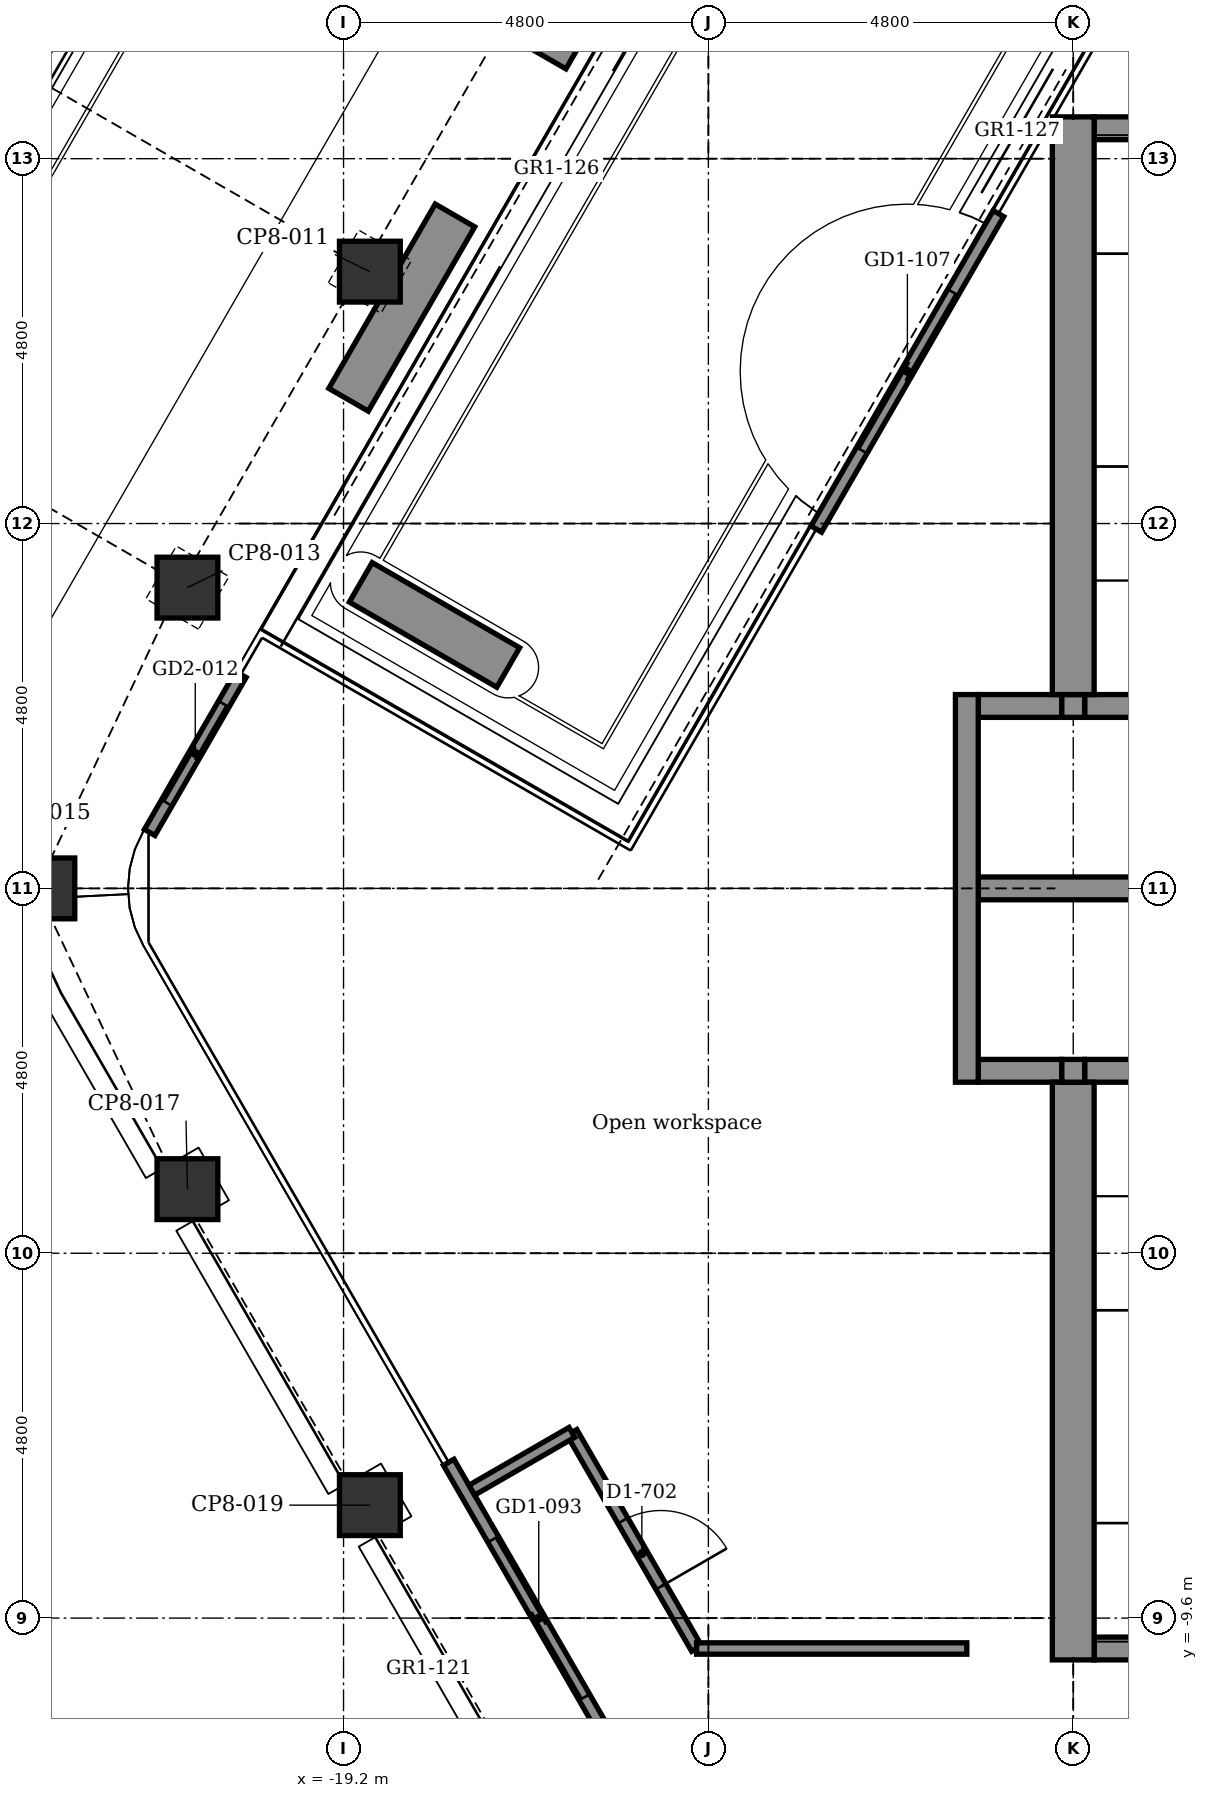
"""IFC4 building model, lengths in metres.
Left out: names, types, materials, properties, quantities, classifications, styles, units other than length and angle.
Written with IfcOpenShell. Run it as: python <this file> out.ifc"""

import sys

from ifc_helpers import new_model, si_unit, direction, frame, frame_2d, origin, origin_2d, place, context, subcontext, project, spatial, rectangle, extrude, element, fill, save


model = new_model("IFC4")
c1 = context("Model", 3, precision=1e-05, world=origin(), true_north=direction((0.0, 1.0)))
c2 = subcontext(c1, "Body", "Model", "MODEL_VIEW")
j1 = project(units=[si_unit("LENGTHUNIT", "METRE"), si_unit("PLANEANGLEUNIT", "RADIAN")], contexts=[c1])
p1 = place(None, origin())
s1 = spatial("IfcSite", under=j1, at=p1, CompositionType="ELEMENT")
p2 = place(p1, origin())
s2 = spatial("IfcBuilding", under=s1, at=p2, CompositionType="ELEMENT")
p3 = place(p2, frame((0.0, 0.0, 254.0)))
s3 = spatial("IfcBuildingStorey", under=s2, at=p3, CompositionType="ELEMENT", Elevation=254.0)
for number, where, z_axis, x_axis in (
    (1, (-18.854, -8.114, -0.15), (0.0, 0.0, 1.0), (0.866, 0.5, 0.0)),
    (2, (-21.254, -3.957, -0.15), (0.0, 0.0, 1.0), (0.866, 0.5, 0.0)),
    (3, (-23.136, 0.0, -0.15), (0.0, 0.0, 1.0), (1.0, 0.0, 0.0)),
    (4, (-21.254, 3.957, -0.15), (0.0, 0.0, 1.0), (0.5, 0.866, 0.0)),
    (5, (-18.854, 8.114, -0.15), (0.0, 0.0, 1.0), (0.5, 0.866, 0.0)),
):
    element("IfcColumn", number, at=place(p3, frame(where, z_axis=z_axis, x_axis=x_axis)), inside=s3, PredefinedType="COLUMN", context=c2, shape_type="SweptSolid", body=[
        extrude(rectangle(XDim=0.8, YDim=0.8, at=origin_2d()), origin(), (0.0, 0.0, 1.0), 3.9),
    ])
p4 = place(p3, frame((-9.325, -10.0, -0.15), z_axis=(0.0, 0.0, 1.0), x_axis=(1.0, 0.0, 0.0)))
e6 = element("IfcWall", 6, at=p4, inside=s3, PredefinedType="STANDARD", context=c2, shape_type="SweptSolid", body=[
    extrude(rectangle(XDim=4.075, YDim=0.3, at=frame_2d((2.038, 0.0))), origin(), (0.0, 0.0, 1.0), 3.9),
])
p5 = place(p3, frame((-10.85, -2.4, -0.15), z_axis=(0.0, 0.0, 1.0), x_axis=(1.0, 0.0, 0.0)))
e7 = element("IfcWall", 7, at=p5, inside=s3, PredefinedType="STANDARD", context=c2, shape_type="SweptSolid", body=[
    extrude(rectangle(XDim=1.1, YDim=0.3, at=frame_2d((0.55, 0.0))), origin(), (0.0, 0.0, 1.0), 3.9),
])
p6 = place(p3, frame((-9.45, -2.4, -0.15), z_axis=(0.0, 0.0, 1.0), x_axis=(1.0, 0.0, 0.0)))
e8 = element("IfcWall", 8, at=p6, inside=s3, PredefinedType="STANDARD", context=c2, shape_type="SweptSolid", body=[
    extrude(rectangle(XDim=1.9, YDim=0.3, at=frame_2d((0.95, 0.0))), origin(), (0.0, 0.0, 1.0), 3.9),
])
p7 = place(p3, frame((-10.85, 0.0, -0.15), z_axis=(0.0, 0.0, 1.0), x_axis=(1.0, 0.0, 0.0)))
e9 = element("IfcWall", 9, at=p7, inside=s3, PredefinedType="STANDARD", context=c2, shape_type="SweptSolid", body=[
    extrude(rectangle(XDim=3.3, YDim=0.3, at=frame_2d((1.65, 0.0))), origin(), (0.0, 0.0, 1.0), 3.9),
])
p8 = place(p3, frame((-10.85, 2.4, -0.15), z_axis=(0.0, 0.0, 1.0), x_axis=(1.0, 0.0, 0.0)))
e10 = element("IfcWall", 10, at=p8, inside=s3, PredefinedType="STANDARD", context=c2, shape_type="SweptSolid", body=[
    extrude(rectangle(XDim=1.1, YDim=0.3, at=frame_2d((0.55, 0.0))), origin(), (0.0, 0.0, 1.0), 3.9),
])
p9 = place(p3, frame((-9.45, 2.4, -0.15), z_axis=(0.0, 0.0, 1.0), x_axis=(1.0, 0.0, 0.0)))
e11 = element("IfcWall", 11, at=p9, inside=s3, PredefinedType="STANDARD", context=c2, shape_type="SweptSolid", body=[
    extrude(rectangle(XDim=1.9, YDim=0.3, at=frame_2d((0.95, 0.0))), origin(), (0.0, 0.0, 1.0), 3.9),
])
p10 = place(p3, frame((-9.325, 10.0, -0.15), z_axis=(0.0, 0.0, 1.0), x_axis=(1.0, 0.0, 0.0)))
e12 = element("IfcWall", 12, at=p10, inside=s3, PredefinedType="STANDARD", context=c2, shape_type="SweptSolid", body=[
    extrude(rectangle(XDim=4.075, YDim=0.3, at=frame_2d((2.038, 0.0))), origin(), (0.0, 0.0, 1.0), 3.9),
])
p11 = place(p3, frame((-11.0, -2.55, -0.15), z_axis=(0.0, 0.0, 1.0), x_axis=(0.0, 1.0, 0.0)))
e13 = element("IfcWall", 13, at=p11, inside=s3, PredefinedType="STANDARD", context=c2, shape_type="SweptSolid", body=[
    extrude(rectangle(XDim=5.1, YDim=0.3, at=frame_2d((2.55, 0.0))), origin(), (0.0, 0.0, 1.0), 3.9),
])
p12 = place(p3, frame((-9.6, -10.15, -0.15), z_axis=(0.0, 0.0, 1.0), x_axis=(0.0, 1.0, 0.0)))
e14 = element("IfcWall", 14, at=p12, inside=s3, PredefinedType="SHEAR", context=c2, shape_type="SweptSolid", body=[
    extrude(rectangle(XDim=7.6, YDim=0.55, at=frame_2d((3.8, 0.0))), origin(), (0.0, 0.0, 1.0), 3.9),
])
for number, where, z_axis, x_axis in (
    (15, (-9.6, -2.55, -0.15), (0.0, 0.0, 1.0), (0.0, 1.0, 0.0)),
    (16, (-9.6, 2.25, -0.15), (0.0, 0.0, 1.0), (0.0, 1.0, 0.0)),
):
    element("IfcWall", number, at=place(p3, frame(where, z_axis=z_axis, x_axis=x_axis)), inside=s3, PredefinedType="STANDARD", context=c2, shape_type="SweptSolid", body=[
        extrude(rectangle(XDim=0.3, YDim=0.3, at=frame_2d((0.15, 0.0))), origin(), (0.0, 0.0, 1.0), 3.9),
    ])
p13 = place(p3, frame((-9.6, 2.55, -0.15), z_axis=(0.0, 0.0, 1.0), x_axis=(0.0, 1.0, 0.0)))
e17 = element("IfcWall", 17, at=p13, inside=s3, PredefinedType="SHEAR", context=c2, shape_type="SweptSolid", body=[
    extrude(rectangle(XDim=7.6, YDim=0.55, at=frame_2d((3.8, 0.0))), origin(), (0.0, 0.0, 1.0), 3.9),
])
p14 = place(p3, frame((-15.447, -11.655, 0.0), z_axis=(0.0, 0.0, 1.0), x_axis=(-0.499978080042, 0.866038058908, 0.0)))
e18 = element("IfcWall", 18, at=p14, inside=s3, PredefinedType="PARTITIONING", context=c2, shape_type="SweptSolid", body=[
    extrude(rectangle(XDim=4.74, YDim=0.16, at=frame_2d((2.37, 0.0))), origin(), (0.0, 0.0, 1.0), 3.75),
])
p15 = place(p14, frame((1.17, 0.0, 0.0)))
e19 = element("IfcOpeningElement", 19, at=p15, cuts=e18, PredefinedType="OPENING", context=c2, shape_type="SweptSolid", body=[
    extrude(rectangle(XDim=2.4, YDim=2.4, at=frame_2d((1.2, 1.2))), frame((0.0, 0.09, 0.0), z_axis=(0.0, -1.0, 0.0), x_axis=(1.0, 0.0, 0.0)), (0.0, 0.0, 1.0), 0.18),
])
p16 = place(p3, frame((-21.751, 0.736, 0.0), z_axis=(0.0, 0.0, 1.0), x_axis=(0.500077600433, 0.865980596518, 0.0)))
e20 = element("IfcWall", 20, at=p16, inside=s3, PredefinedType="PARTITIONING", context=c2, shape_type="SweptSolid", body=[
    extrude(rectangle(XDim=2.4, YDim=0.16, at=frame_2d((1.2, 0.0))), origin(), (0.0, 0.0, 1.0), 3.75),
])
p17 = place(p16, frame((0.45, 0.0, 0.0)))
e21 = element("IfcOpeningElement", 21, at=p17, cuts=e20, PredefinedType="OPENING", context=c2, shape_type="SweptSolid", body=[
    extrude(rectangle(XDim=1.5, YDim=2.4, at=frame_2d((0.75, 1.2))), frame((0.0, 0.09, 0.0), z_axis=(0.0, -1.0, 0.0), x_axis=(1.0, 0.0, 0.0)), (0.0, 0.0, 1.0), 0.18),
])
p18 = place(p3, frame((-12.98, 4.727, 0.0), z_axis=(0.0, 0.0, 1.0), x_axis=(0.500011970786, 0.866018492338, 0.0)))
e22 = element("IfcWall", 22, at=p18, inside=s3, PredefinedType="PARTITIONING", context=c2, shape_type="SweptSolid", body=[
    extrude(rectangle(XDim=4.793, YDim=0.16, at=frame_2d((2.397, 0.0))), origin(), (0.0, 0.0, 1.0), 3.75),
])
p19 = place(p18, frame((1.197, 0.0, 0.0)))
e23 = element("IfcOpeningElement", 23, at=p19, cuts=e22, PredefinedType="OPENING", context=c2, shape_type="SweptSolid", body=[
    extrude(rectangle(XDim=2.4, YDim=2.4, at=frame_2d((1.2, 1.2))), frame((0.0, 0.09, 0.0), z_axis=(0.0, -1.0, 0.0), x_axis=(1.0, 0.0, 0.0)), (0.0, 0.0, 1.0), 0.18),
])
p20 = place(p3, frame((-17.034, 2.906, 0.0), z_axis=(0.0, 0.0, 1.0), x_axis=(-0.866027664105, 0.49999608499, 0.0)))
e24 = element("IfcWall", 24, at=p20, inside=s3, PredefinedType="USERDEFINED", context=c2, shape_type="SweptSolid", body=[
    extrude(rectangle(XDim=2.24, YDim=0.6, at=frame_2d((1.12, 0.0))), origin(), (0.0, 0.0, 1.0), 0.7),
])
p21 = place(p3, frame((-17.734, 8.853, 0.0), z_axis=(0.0, 0.0, 1.0), x_axis=(-0.500049511043, -0.865996816683, 0.0)))
e25 = element("IfcWall", 25, at=p21, inside=s3, PredefinedType="USERDEFINED", context=c2, shape_type="SweptSolid", body=[
    extrude(rectangle(XDim=2.8, YDim=0.6, at=frame_2d((1.4, 0.0))), origin(), (0.0, 0.0, 1.0), 0.7),
])
p22 = place(p3, frame((-16.534, 10.932, 0.0), z_axis=(0.0, 0.0, 1.0), x_axis=(0.49998411664, 0.866034573852, 0.0)))
e26 = element("IfcWall", 26, at=p22, inside=s3, PredefinedType="USERDEFINED", context=c2, shape_type="SweptSolid", body=[
    extrude(rectangle(XDim=2.8, YDim=0.6, at=frame_2d((1.4, 0.0))), origin(), (0.0, 0.0, 1.0), 0.7),
])
p23 = place(p3, frame((-16.196, -7.157, 0.0), z_axis=(0.0, 0.0, 1.0), x_axis=(0.499954196102, -0.866051847062, 0.0)))
e27 = element("IfcWall", 27, at=p23, inside=s3, PredefinedType="PARTITIONING", context=c2, shape_type="SweptSolid", body=[
    extrude(rectangle(XDim=3.283, YDim=0.15, at=frame_2d((1.642, 0.0))), origin(), (0.0, 0.0, 1.0), 3.75),
])
p24 = place(p23, frame((1.342, 0.0, 0.0)))
e28 = element("IfcOpeningElement", 28, at=p24, cuts=e27, PredefinedType="OPENING", context=c2, shape_type="SweptSolid", body=[
    extrude(rectangle(XDim=1.0, YDim=2.1, at=frame_2d((0.5, 1.05))), frame((0.0, 0.085, 0.0), z_axis=(0.0, -1.0, 0.0), x_axis=(1.0, 0.0, 0.0)), (0.0, 0.0, 1.0), 0.17),
])
p25 = place(p3, frame((-17.512, -7.917, 0.0), z_axis=(0.0, 0.0, 1.0), x_axis=(0.865960906633, 0.500111695708, 0.0)))
e29 = element("IfcWall", 29, at=p25, inside=s3, PredefinedType="PARTITIONING", context=c2, shape_type="SweptSolid", body=[
    extrude(rectangle(XDim=1.52, YDim=0.15, at=frame_2d((0.76, 0.0))), origin(), (0.0, 0.0, 1.0), 3.75),
])
p26 = place(p3, frame((-14.555, -10.0, 0.0), z_axis=(0.0, 0.0, 1.0), x_axis=(1.0, 0.0, 0.0)))
e30 = element("IfcWall", 30, at=p26, inside=s3, PredefinedType="PARTITIONING", context=c2, shape_type="SweptSolid", body=[
    extrude(rectangle(XDim=3.555, YDim=0.15, at=frame_2d((1.777, 0.0))), origin(), (0.0, 0.0, 1.0), 3.75),
])
p27 = place(p15, origin())
e31 = element("IfcDoor", 31, at=p27, inside=s3, OperationType="DOUBLE_DOOR_SLIDING", PredefinedType="DOOR", context=c2, shape_type="SweptSolid", body=[
    extrude(rectangle(XDim=2.4, YDim=2.4, at=frame_2d((1.2, 1.2))), frame((0.0, 0.025, 0.0), z_axis=(0.0, -1.0, 0.0), x_axis=(1.0, 0.0, 0.0)), (0.0, 0.0, 1.0), 0.05),
])
fill(e19, e31)
p28 = place(p17, origin())
e32 = element("IfcDoor", 32, at=p28, inside=s3, OperationType="DOUBLE_DOOR_SLIDING", PredefinedType="DOOR", context=c2, shape_type="SweptSolid", body=[
    extrude(rectangle(XDim=1.5, YDim=2.4, at=frame_2d((0.75, 1.2))), frame((0.0, 0.025, 0.0), z_axis=(0.0, -1.0, 0.0), x_axis=(1.0, 0.0, 0.0)), (0.0, 0.0, 1.0), 0.05),
])
fill(e21, e32)
p29 = place(p19, origin())
e33 = element("IfcDoor", 33, at=p29, inside=s3, OperationType="DOUBLE_DOOR_SLIDING", PredefinedType="DOOR", context=c2, shape_type="SweptSolid", body=[
    extrude(rectangle(XDim=2.4, YDim=2.4, at=frame_2d((1.2, 1.2))), frame((0.0, 0.025, 0.0), z_axis=(0.0, -1.0, 0.0), x_axis=(1.0, 0.0, 0.0)), (0.0, 0.0, 1.0), 0.05),
])
fill(e23, e33)
p30 = place(p24, origin())
e34 = element("IfcDoor", 34, at=p30, inside=s3, OperationType="SINGLE_SWING_RIGHT", PredefinedType="DOOR", context=c2, shape_type="SweptSolid", body=[
    extrude(rectangle(XDim=1.0, YDim=2.1, at=frame_2d((0.5, 1.05))), frame((0.0, 0.025, 0.0), z_axis=(0.0, -1.0, 0.0), x_axis=(1.0, 0.0, 0.0)), (0.0, 0.0, 1.0), 0.05),
])
fill(e28, e34)
save(model, sys.argv[1])
